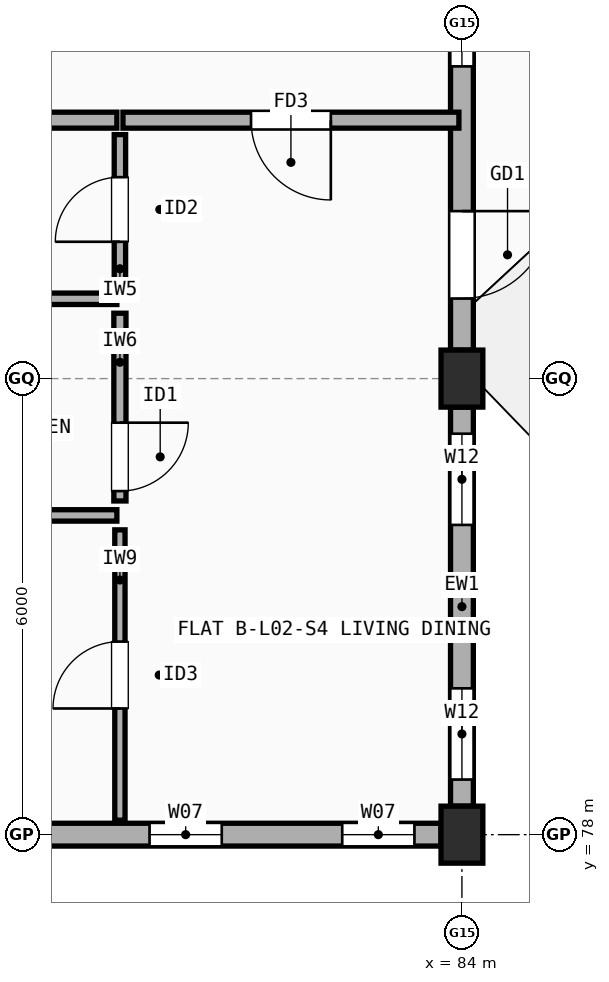
"""IFC4 building model, lengths in metres.
Left out: names, types, materials, properties, quantities, classifications, styles, units other than length and angle.
Written with IfcOpenShell. Run it as: python <this file> out.ifc"""

import sys

from ifc_helpers import new_model, si_unit, direction, frame, frame_2d, origin, origin_2d, place, context, subcontext, project, spatial, rectangle, extrude, element, fill, save


model = new_model("IFC4")
c1 = context("Model", 3, precision=1e-05, world=origin(), true_north=direction((0.0, 1.0)))
c2 = subcontext(c1, "Body", "Model", "MODEL_VIEW")
j1 = project(units=[si_unit("LENGTHUNIT", "METRE"), si_unit("PLANEANGLEUNIT", "RADIAN")], contexts=[c1])
p1 = place(None, origin())
s1 = spatial("IfcSite", under=j1, at=p1, CompositionType="ELEMENT")
p2 = place(p1, origin())
s2 = spatial("IfcBuilding", under=s1, at=p2, CompositionType="ELEMENT")
p3 = place(p2, frame((0.0, 0.0, 7.7)))
s3 = spatial("IfcBuildingStorey", under=s2, at=p3, CompositionType="ELEMENT", Elevation=7.7)
for number, where, z_axis, x_axis in (
    (1, (84.0, 78.0, 0.0), (0.0, 0.0, 1.0), (1.0, 0.0, 0.0)),
    (2, (84.0, 84.0, 0.0), (0.0, 0.0, 1.0), (1.0, 0.0, 0.0)),
):
    element("IfcColumn", number, at=place(p3, frame(where, z_axis=z_axis, x_axis=x_axis)), inside=s3, PredefinedType="COLUMN", context=c2, shape_type="SweptSolid", body=[
        extrude(rectangle(XDim=0.55, YDim=0.75, at=origin_2d()), origin(), (0.0, 0.0, 1.0), 2.955),
    ])
p4 = place(p3, frame((78.275, 78.0, 0.0), z_axis=(0.0, 0.0, 1.0), x_axis=(1.0, 0.0, 0.0)))
e3 = element("IfcWall", 3, at=p4, inside=s3, PredefinedType="STANDARD", context=c2, shape_type="SweptSolid", body=[
    extrude(rectangle(XDim=5.45, YDim=0.3, at=frame_2d((2.725, 0.0))), origin(), (0.0, 0.0, 1.0), 2.437),
])
p5 = place(p4, frame((1.615, 0.0, 0.9)))
e4 = element("IfcOpeningElement", 4, at=p5, cuts=e3, PredefinedType="OPENING", context=c2, shape_type="SweptSolid", body=[
    extrude(rectangle(XDim=0.95, YDim=1.35, at=frame_2d((0.475, 0.675))), frame((0.0, 0.16, 0.0), z_axis=(0.0, -1.0, 0.0), x_axis=(1.0, 0.0, 0.0)), (0.0, 0.0, 1.0), 0.32),
])
p6 = place(p4, frame((4.15, 0.0, 0.9)))
e5 = element("IfcOpeningElement", 5, at=p6, cuts=e3, PredefinedType="OPENING", context=c2, shape_type="SweptSolid", body=[
    extrude(rectangle(XDim=0.95, YDim=1.35, at=frame_2d((0.475, 0.675))), frame((0.0, 0.16, 0.0), z_axis=(0.0, -1.0, 0.0), x_axis=(1.0, 0.0, 0.0)), (0.0, 0.0, 1.0), 0.32),
])
p7 = place(p3, frame((84.0, 78.375, 0.0), z_axis=(0.0, 0.0, 1.0), x_axis=(0.0, 1.0, 0.0)))
e6 = element("IfcWall", 6, at=p7, inside=s3, PredefinedType="STANDARD", context=c2, shape_type="SweptSolid", body=[
    extrude(rectangle(XDim=5.25, YDim=0.3, at=frame_2d((2.625, 0.0))), origin(), (0.0, 0.0, 1.0), 2.437),
])
p8 = place(p7, frame((0.35, 0.0, 0.9)))
e7 = element("IfcOpeningElement", 7, at=p8, cuts=e6, PredefinedType="OPENING", context=c2, shape_type="SweptSolid", body=[
    extrude(rectangle(XDim=1.2, YDim=1.35, at=frame_2d((0.6, 0.675))), frame((0.0, 0.16, 0.0), z_axis=(0.0, -1.0, 0.0), x_axis=(1.0, 0.0, 0.0)), (0.0, 0.0, 1.0), 0.32),
])
p9 = place(p7, frame((3.7, 0.0, 0.9)))
e8 = element("IfcOpeningElement", 8, at=p9, cuts=e6, PredefinedType="OPENING", context=c2, shape_type="SweptSolid", body=[
    extrude(rectangle(XDim=1.2, YDim=1.35, at=frame_2d((0.6, 0.675))), frame((0.0, 0.16, 0.0), z_axis=(0.0, -1.0, 0.0), x_axis=(1.0, 0.0, 0.0)), (0.0, 0.0, 1.0), 0.32),
])
p10 = place(p3, frame((84.0, 84.375, 0.0), z_axis=(0.0, 0.0, 1.0), x_axis=(0.0, 1.0, 0.0)))
e9 = element("IfcWall", 9, at=p10, inside=s3, PredefinedType="STANDARD", context=c2, shape_type="SweptSolid", body=[
    extrude(rectangle(XDim=5.25, YDim=0.3, at=frame_2d((2.625, 0.0))), origin(), (0.0, 0.0, 1.0), 2.437),
])
p11 = place(p10, frame((0.678, 0.0, 0.0)))
e10 = element("IfcOpeningElement", 10, at=p11, cuts=e9, PredefinedType="OPENING", context=c2, shape_type="SweptSolid", body=[
    extrude(rectangle(XDim=1.15, YDim=2.15, at=frame_2d((0.575, 1.075))), frame((0.0, 0.16, 0.0), z_axis=(0.0, -1.0, 0.0), x_axis=(1.0, 0.0, 0.0)), (0.0, 0.0, 1.0), 0.32),
])
p12 = place(p10, frame((3.732, 0.0, 0.9)))
e11 = element("IfcOpeningElement", 11, at=p12, cuts=e9, PredefinedType="OPENING", context=c2, shape_type="SweptSolid", body=[
    extrude(rectangle(XDim=0.85, YDim=1.25, at=frame_2d((0.425, 0.625))), frame((0.0, 0.16, 0.0), z_axis=(0.0, -1.0, 0.0), x_axis=(1.0, 0.0, 0.0)), (0.0, 0.0, 1.0), 0.32),
])
p13 = place(p3, frame((75.04, 87.4, 0.0), z_axis=(0.0, 0.0, 1.0), x_axis=(1.0, 0.0, 0.0)))
e12 = element("IfcWall", 12, at=p13, inside=s3, PredefinedType="SOLIDWALL", context=c2, shape_type="SweptSolid", body=[
    extrude(rectangle(XDim=4.42, YDim=0.21, at=frame_2d((2.21, 0.0))), origin(), (0.0, 0.0, 1.0), 2.437),
])
p14 = place(p3, frame((79.54, 87.4, 0.0), z_axis=(0.0, 0.0, 1.0), x_axis=(1.0, 0.0, 0.0)))
e13 = element("IfcWall", 13, at=p14, inside=s3, PredefinedType="SOLIDWALL", context=c2, shape_type="SweptSolid", body=[
    extrude(rectangle(XDim=4.42, YDim=0.21, at=frame_2d((2.21, 0.0))), origin(), (0.0, 0.0, 1.0), 2.437),
])
p15 = place(p14, frame((1.685, 0.0, 0.0)))
e14 = element("IfcOpeningElement", 14, at=p15, cuts=e13, PredefinedType="OPENING", context=c2, shape_type="SweptSolid", body=[
    extrude(rectangle(XDim=1.05, YDim=2.15, at=frame_2d((0.525, 1.075))), frame((0.0, 0.115, 0.0), z_axis=(0.0, -1.0, 0.0), x_axis=(1.0, 0.0, 0.0)), (0.0, 0.0, 1.0), 0.23),
])
p16 = place(p3, frame((79.5, 78.19, 0.0), z_axis=(0.0, 0.0, 1.0), x_axis=(0.0, 1.0, 0.0)))
e15 = element("IfcWall", 15, at=p16, inside=s3, PredefinedType="PARTITIONING", context=c2, shape_type="SweptSolid", body=[
    extrude(rectangle(XDim=3.82, YDim=0.135, at=frame_2d((1.91, 0.0))), origin(), (0.0, 0.0, 1.0), 2.955),
])
p17 = place(p16, frame((1.47, 0.0, 0.0)))
e16 = element("IfcOpeningElement", 16, at=p17, cuts=e15, PredefinedType="OPENING", context=c2, shape_type="SweptSolid", body=[
    extrude(rectangle(XDim=0.88, YDim=2.1, at=frame_2d((0.44, 1.05))), frame((0.0, 0.077, 0.0), z_axis=(0.0, -1.0, 0.0), x_axis=(1.0, 0.0, 0.0)), (0.0, 0.0, 1.0), 0.155),
])
p18 = place(p3, frame((79.5, 82.39, 0.0), z_axis=(0.0, 0.0, 1.0), x_axis=(0.0, 1.0, 0.0)))
e17 = element("IfcWall", 17, at=p18, inside=s3, PredefinedType="PLUMBINGWALL", context=c2, shape_type="SweptSolid", body=[
    extrude(rectangle(XDim=2.47, YDim=0.16, at=frame_2d((1.235, 0.0))), origin(), (0.0, 0.0, 1.0), 2.437),
])
p19 = place(p18, frame((0.13, 0.0, 0.0)))
e18 = element("IfcOpeningElement", 18, at=p19, cuts=e17, PredefinedType="OPENING", context=c2, shape_type="SweptSolid", body=[
    extrude(rectangle(XDim=0.9, YDim=2.1, at=frame_2d((0.45, 1.05))), frame((0.0, 0.09, 0.0), z_axis=(0.0, -1.0, 0.0), x_axis=(1.0, 0.0, 0.0)), (0.0, 0.0, 1.0), 0.18),
])
p20 = place(p3, frame((79.5, 85.24, 0.0), z_axis=(0.0, 0.0, 1.0), x_axis=(0.0, 1.0, 0.0)))
e19 = element("IfcWall", 19, at=p20, inside=s3, PredefinedType="PARTITIONING", context=c2, shape_type="SweptSolid", body=[
    extrude(rectangle(XDim=1.97, YDim=0.15, at=frame_2d((0.985, 0.0))), origin(), (0.0, 0.0, 1.0), 2.955),
])
p21 = place(p20, frame((0.56, 0.0, 0.0)))
e20 = element("IfcOpeningElement", 20, at=p21, cuts=e19, PredefinedType="OPENING", context=c2, shape_type="SweptSolid", body=[
    extrude(rectangle(XDim=0.85, YDim=2.1, at=frame_2d((0.425, 1.05))), frame((0.0, 0.085, 0.0), z_axis=(0.0, -1.0, 0.0), x_axis=(1.0, 0.0, 0.0)), (0.0, 0.0, 1.0), 0.17),
])
for number, where, z_axis, x_axis in (
    (21, (75.04, 82.2, 0.0), (0.0, 0.0, 1.0), (1.0, 0.0, 0.0)),
    (22, (75.04, 85.05, 0.0), (0.0, 0.0, 1.0), (1.0, 0.0, 0.0)),
):
    element("IfcWall", number, at=place(p3, frame(where, z_axis=z_axis, x_axis=x_axis)), inside=s3, PredefinedType="PARTITIONING", context=c2, shape_type="SweptSolid", body=[
        extrude(rectangle(XDim=4.42, YDim=0.15, at=frame_2d((2.21, 0.0))), origin(), (0.0, 0.0, 1.0), 2.437),
    ])
p22 = place(p5, origin())
e23 = element("IfcWindow", 23, at=p22, inside=s3, PartitioningType="SINGLE_PANEL", PredefinedType="WINDOW", context=c2, shape_type="SweptSolid", body=[
    extrude(rectangle(XDim=0.95, YDim=1.35, at=frame_2d((0.475, 0.675))), frame((0.0, 0.03, 0.0), z_axis=(0.0, -1.0, 0.0), x_axis=(1.0, 0.0, 0.0)), (0.0, 0.0, 1.0), 0.06),
])
fill(e4, e23)
p23 = place(p6, origin())
e24 = element("IfcWindow", 24, at=p23, inside=s3, PartitioningType="SINGLE_PANEL", PredefinedType="WINDOW", context=c2, shape_type="SweptSolid", body=[
    extrude(rectangle(XDim=0.95, YDim=1.35, at=frame_2d((0.475, 0.675))), frame((0.0, 0.03, 0.0), z_axis=(0.0, -1.0, 0.0), x_axis=(1.0, 0.0, 0.0)), (0.0, 0.0, 1.0), 0.06),
])
fill(e5, e24)
p24 = place(p8, origin())
e25 = element("IfcWindow", 25, at=p24, inside=s3, PartitioningType="SINGLE_PANEL", PredefinedType="WINDOW", context=c2, shape_type="SweptSolid", body=[
    extrude(rectangle(XDim=1.2, YDim=1.35, at=frame_2d((0.6, 0.675))), frame((0.0, 0.03, 0.0), z_axis=(0.0, -1.0, 0.0), x_axis=(1.0, 0.0, 0.0)), (0.0, 0.0, 1.0), 0.06),
])
fill(e7, e25)
p25 = place(p9, origin())
e26 = element("IfcWindow", 26, at=p25, inside=s3, PartitioningType="SINGLE_PANEL", PredefinedType="WINDOW", context=c2, shape_type="SweptSolid", body=[
    extrude(rectangle(XDim=1.2, YDim=1.35, at=frame_2d((0.6, 0.675))), frame((0.0, 0.03, 0.0), z_axis=(0.0, -1.0, 0.0), x_axis=(1.0, 0.0, 0.0)), (0.0, 0.0, 1.0), 0.06),
])
fill(e8, e26)
p26 = place(p11, frame((1.15, 0.0, 0.0), z_axis=(0.0, 0.0, 1.0), x_axis=(-1.0, 0.0, 0.0)))
e27 = element("IfcDoor", 27, at=p26, inside=s3, OperationType="SINGLE_SWING_RIGHT", PredefinedType="DOOR", context=c2, shape_type="SweptSolid", body=[
    extrude(rectangle(XDim=1.15, YDim=2.15, at=frame_2d((0.575, 1.075))), frame((0.0, 0.025, 0.0), z_axis=(0.0, -1.0, 0.0), x_axis=(1.0, 0.0, 0.0)), (0.0, 0.0, 1.0), 0.05),
])
fill(e10, e27)
p27 = place(p12, origin())
e28 = element("IfcWindow", 28, at=p27, inside=s3, PartitioningType="SINGLE_PANEL", PredefinedType="WINDOW", context=c2, shape_type="SweptSolid", body=[
    extrude(rectangle(XDim=0.85, YDim=1.25, at=frame_2d((0.425, 0.625))), frame((0.0, 0.03, 0.0), z_axis=(0.0, -1.0, 0.0), x_axis=(1.0, 0.0, 0.0)), (0.0, 0.0, 1.0), 0.06),
])
fill(e11, e28)
p28 = place(p15, origin())
e29 = element("IfcDoor", 29, at=p28, inside=s3, OperationType="SINGLE_SWING_RIGHT", PredefinedType="DOOR", context=c2, shape_type="SweptSolid", body=[
    extrude(rectangle(XDim=1.05, YDim=2.15, at=frame_2d((0.525, 1.075))), frame((0.0, 0.025, 0.0), z_axis=(0.0, -1.0, 0.0), x_axis=(1.0, 0.0, 0.0)), (0.0, 0.0, 1.0), 0.05),
])
fill(e14, e29)
p29 = place(p17, origin())
e30 = element("IfcDoor", 30, at=p29, inside=s3, OperationType="SINGLE_SWING_LEFT", PredefinedType="DOOR", context=c2, shape_type="SweptSolid", body=[
    extrude(rectangle(XDim=0.88, YDim=2.1, at=frame_2d((0.44, 1.05))), frame((0.0, 0.025, 0.0), z_axis=(0.0, -1.0, 0.0), x_axis=(1.0, 0.0, 0.0)), (0.0, 0.0, 1.0), 0.05),
])
fill(e16, e30)
p30 = place(p19, origin())
e31 = element("IfcDoor", 31, at=p30, inside=s3, OperationType="SINGLE_SWING_RIGHT", PredefinedType="DOOR", context=c2, shape_type="SweptSolid", body=[
    extrude(rectangle(XDim=0.9, YDim=2.1, at=frame_2d((0.45, 1.05))), frame((0.0, 0.025, 0.0), z_axis=(0.0, -1.0, 0.0), x_axis=(1.0, 0.0, 0.0)), (0.0, 0.0, 1.0), 0.05),
])
fill(e18, e31)
p31 = place(p21, origin())
e32 = element("IfcDoor", 32, at=p31, inside=s3, OperationType="SINGLE_SWING_LEFT", PredefinedType="DOOR", context=c2, shape_type="SweptSolid", body=[
    extrude(rectangle(XDim=0.85, YDim=2.1, at=frame_2d((0.425, 1.05))), frame((0.0, 0.025, 0.0), z_axis=(0.0, -1.0, 0.0), x_axis=(1.0, 0.0, 0.0)), (0.0, 0.0, 1.0), 0.05),
])
fill(e20, e32)
save(model, sys.argv[1])
